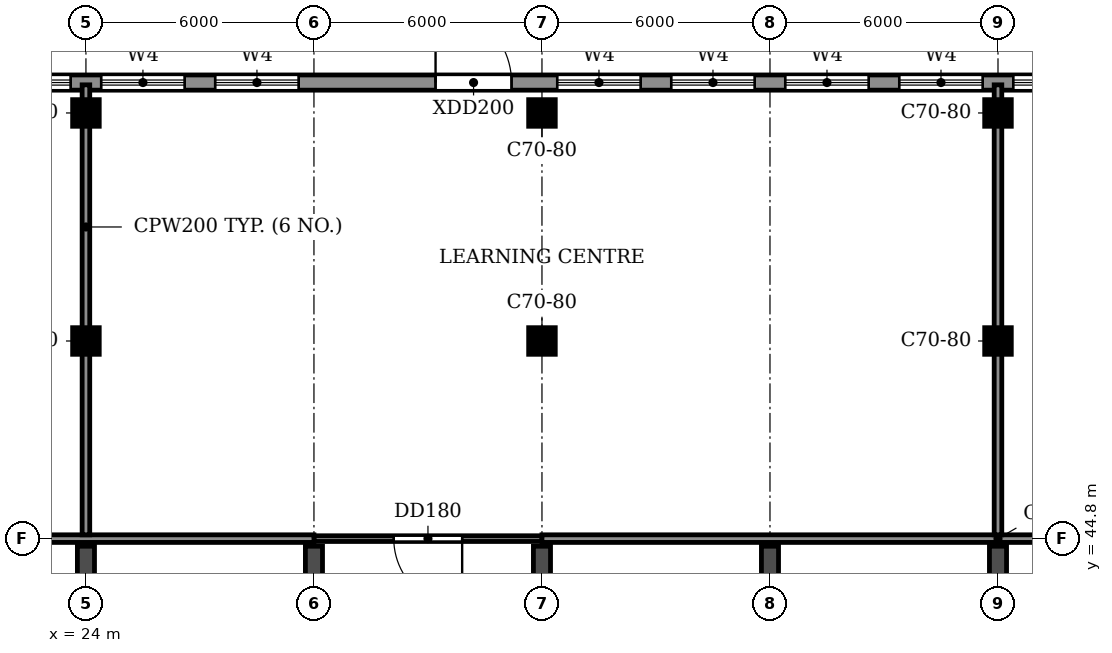
"""IFC4 building model, lengths in metres.
Left out: names, types, materials, properties, quantities, classifications, styles, units other than length and angle.
Written with IfcOpenShell. Run it as: python <this file> out.ifc"""

import sys

from ifc_helpers import new_model, si_unit, direction, frame, frame_2d, origin, origin_2d, place, context, subcontext, project, spatial, rectangle, extrude, source, transform, mapped, element, fill, save


model = new_model("IFC4")
c1 = context("Model", 3, precision=1e-05, world=origin(), true_north=direction((0.0, 1.0)))
c2 = subcontext(c1, "Body", "Model", "MODEL_VIEW")
j1 = project(units=[si_unit("LENGTHUNIT", "METRE"), si_unit("PLANEANGLEUNIT", "RADIAN")], contexts=[c1])
p1 = place(None, origin())
s1 = spatial("IfcSite", under=j1, at=p1, CompositionType="ELEMENT")
p2 = place(p1, origin())
s2 = spatial("IfcBuilding", under=s1, at=p2, CompositionType="ELEMENT")
p3 = place(p2, frame((0.0, 0.0, 15.0)))
s3 = spatial("IfcBuildingStorey", under=s2, at=p3, CompositionType="ELEMENT", Elevation=15.0)
for number, where, z_axis, x_axis in (
    (1, (24.0, 30.55, 0.0), (0.0, 0.0, 1.0), (0.0, 1.0, 0.0)),
    (2, (30.0, 30.55, 0.0), (0.0, 0.0, 1.0), (0.0, 1.0, 0.0)),
    (3, (36.0, 30.55, 0.0), (0.0, 0.0, 1.0), (0.0, 1.0, 0.0)),
    (4, (42.0, 30.55, 0.0), (0.0, 0.0, 1.0), (0.0, 1.0, 0.0)),
    (5, (48.0, 30.55, 0.0), (0.0, 0.0, 1.0), (0.0, 1.0, 0.0)),
):
    element("IfcWall", number, at=place(p3, frame(where, z_axis=z_axis, x_axis=x_axis)), inside=s3, PredefinedType="SHEAR", context=c2, shape_type="SweptSolid", body=[
        extrude(rectangle(XDim=14.05, YDim=0.45, at=frame_2d((7.025, 0.0))), origin(), (0.0, 0.0, 1.0), 3.92),
    ])
m1 = source(origin(), c2, "Body", "SweptSolid", [
    extrude(rectangle(XDim=0.7, YDim=0.7, at=origin_2d()), origin(), (0.0, 0.0, 1.0), 3.92),
])
for number, where, z_axis, x_axis in (
    (6, (24.0, 56.0, 0.0), (0.0, 0.0, 1.0), (1.0, 0.0, 0.0)),
    (7, (36.0, 56.0, 0.0), (0.0, 0.0, 1.0), (1.0, 0.0, 0.0)),
    (8, (48.0, 56.0, 0.0), (0.0, 0.0, 1.0), (1.0, 0.0, 0.0)),
    (9, (24.0, 50.0, 0.0), (0.0, 0.0, 1.0), (1.0, 0.0, 0.0)),
    (10, (36.0, 50.0, 0.0), (0.0, 0.0, 1.0), (1.0, 0.0, 0.0)),
    (11, (48.0, 50.0, 0.0), (0.0, 0.0, 1.0), (1.0, 0.0, 0.0)),
):
    element("IfcColumn", number, at=place(p3, frame(where, z_axis=z_axis, x_axis=x_axis)), inside=s3, PredefinedType="COLUMN", context=c2, shape_type="MappedRepresentation", body=[
        mapped(m1, transform((0.0, 0.0, 0.0))),
    ])
p4 = place(p3, frame((105.0, 56.8, 0.0), z_axis=(0.0, 0.0, 1.0), x_axis=(-1.0, 0.0, 0.0)))
e12 = element("IfcWall", 12, at=p4, inside=s3, PredefinedType="STANDARD", context=c2, shape_type="SweptSolid", body=[
    extrude(rectangle(XDim=108.0, YDim=0.4, at=frame_2d((54.0, 0.0))), origin(), (0.0, 0.0, 1.0), 3.92),
])
p5 = place(p4, frame((102.4, 0.0, 0.9)))
e13 = element("IfcOpeningElement", 13, at=p5, cuts=e12, PredefinedType="OPENING", context=c2, shape_type="SweptSolid", body=[
    extrude(rectangle(XDim=2.2, YDim=2.7, at=frame_2d((1.1, 1.35))), frame((0.0, 0.21, 0.0), z_axis=(0.0, -1.0, 0.0), x_axis=(1.0, 0.0, 0.0)), (0.0, 0.0, 1.0), 0.42),
])
p6 = place(p4, frame((99.4, 0.0, 0.9)))
e14 = element("IfcOpeningElement", 14, at=p6, cuts=e12, PredefinedType="OPENING", context=c2, shape_type="SweptSolid", body=[
    extrude(rectangle(XDim=2.2, YDim=2.7, at=frame_2d((1.1, 1.35))), frame((0.0, 0.21, 0.0), z_axis=(0.0, -1.0, 0.0), x_axis=(1.0, 0.0, 0.0)), (0.0, 0.0, 1.0), 0.42),
])
p7 = place(p4, frame((90.4, 0.0, 0.9)))
e15 = element("IfcOpeningElement", 15, at=p7, cuts=e12, PredefinedType="OPENING", context=c2, shape_type="SweptSolid", body=[
    extrude(rectangle(XDim=2.2, YDim=2.7, at=frame_2d((1.1, 1.35))), frame((0.0, 0.21, 0.0), z_axis=(0.0, -1.0, 0.0), x_axis=(1.0, 0.0, 0.0)), (0.0, 0.0, 1.0), 0.42),
])
p8 = place(p4, frame((87.4, 0.0, 0.9)))
e16 = element("IfcOpeningElement", 16, at=p8, cuts=e12, PredefinedType="OPENING", context=c2, shape_type="SweptSolid", body=[
    extrude(rectangle(XDim=2.2, YDim=2.7, at=frame_2d((1.1, 1.35))), frame((0.0, 0.21, 0.0), z_axis=(0.0, -1.0, 0.0), x_axis=(1.0, 0.0, 0.0)), (0.0, 0.0, 1.0), 0.42),
])
p9 = place(p4, frame((84.4, 0.0, 0.9)))
e17 = element("IfcOpeningElement", 17, at=p9, cuts=e12, PredefinedType="OPENING", context=c2, shape_type="SweptSolid", body=[
    extrude(rectangle(XDim=2.2, YDim=2.7, at=frame_2d((1.1, 1.35))), frame((0.0, 0.21, 0.0), z_axis=(0.0, -1.0, 0.0), x_axis=(1.0, 0.0, 0.0)), (0.0, 0.0, 1.0), 0.42),
])
p10 = place(p4, frame((81.4, 0.0, 0.9)))
e18 = element("IfcOpeningElement", 18, at=p10, cuts=e12, PredefinedType="OPENING", context=c2, shape_type="SweptSolid", body=[
    extrude(rectangle(XDim=2.2, YDim=2.7, at=frame_2d((1.1, 1.35))), frame((0.0, 0.21, 0.0), z_axis=(0.0, -1.0, 0.0), x_axis=(1.0, 0.0, 0.0)), (0.0, 0.0, 1.0), 0.42),
])
p11 = place(p4, frame((78.4, 0.0, 0.9)))
e19 = element("IfcOpeningElement", 19, at=p11, cuts=e12, PredefinedType="OPENING", context=c2, shape_type="SweptSolid", body=[
    extrude(rectangle(XDim=2.2, YDim=2.7, at=frame_2d((1.1, 1.35))), frame((0.0, 0.21, 0.0), z_axis=(0.0, -1.0, 0.0), x_axis=(1.0, 0.0, 0.0)), (0.0, 0.0, 1.0), 0.42),
])
p12 = place(p4, frame((75.4, 0.0, 0.9)))
e20 = element("IfcOpeningElement", 20, at=p12, cuts=e12, PredefinedType="OPENING", context=c2, shape_type="SweptSolid", body=[
    extrude(rectangle(XDim=2.2, YDim=2.7, at=frame_2d((1.1, 1.35))), frame((0.0, 0.21, 0.0), z_axis=(0.0, -1.0, 0.0), x_axis=(1.0, 0.0, 0.0)), (0.0, 0.0, 1.0), 0.42),
])
p13 = place(p4, frame((66.4, 0.0, 0.9)))
e21 = element("IfcOpeningElement", 21, at=p13, cuts=e12, PredefinedType="OPENING", context=c2, shape_type="SweptSolid", body=[
    extrude(rectangle(XDim=2.2, YDim=2.7, at=frame_2d((1.1, 1.35))), frame((0.0, 0.21, 0.0), z_axis=(0.0, -1.0, 0.0), x_axis=(1.0, 0.0, 0.0)), (0.0, 0.0, 1.0), 0.42),
])
p14 = place(p4, frame((63.4, 0.0, 0.9)))
e22 = element("IfcOpeningElement", 22, at=p14, cuts=e12, PredefinedType="OPENING", context=c2, shape_type="SweptSolid", body=[
    extrude(rectangle(XDim=2.2, YDim=2.7, at=frame_2d((1.1, 1.35))), frame((0.0, 0.21, 0.0), z_axis=(0.0, -1.0, 0.0), x_axis=(1.0, 0.0, 0.0)), (0.0, 0.0, 1.0), 0.42),
])
p15 = place(p4, frame((60.4, 0.0, 0.9)))
e23 = element("IfcOpeningElement", 23, at=p15, cuts=e12, PredefinedType="OPENING", context=c2, shape_type="SweptSolid", body=[
    extrude(rectangle(XDim=2.2, YDim=2.7, at=frame_2d((1.1, 1.35))), frame((0.0, 0.21, 0.0), z_axis=(0.0, -1.0, 0.0), x_axis=(1.0, 0.0, 0.0)), (0.0, 0.0, 1.0), 0.42),
])
p16 = place(p4, frame((57.4, 0.0, 0.9)))
e24 = element("IfcOpeningElement", 24, at=p16, cuts=e12, PredefinedType="OPENING", context=c2, shape_type="SweptSolid", body=[
    extrude(rectangle(XDim=2.2, YDim=2.7, at=frame_2d((1.1, 1.35))), frame((0.0, 0.21, 0.0), z_axis=(0.0, -1.0, 0.0), x_axis=(1.0, 0.0, 0.0)), (0.0, 0.0, 1.0), 0.42),
])
p17 = place(p4, frame((54.4, 0.0, 0.9)))
e25 = element("IfcOpeningElement", 25, at=p17, cuts=e12, PredefinedType="OPENING", context=c2, shape_type="SweptSolid", body=[
    extrude(rectangle(XDim=2.2, YDim=2.7, at=frame_2d((1.1, 1.35))), frame((0.0, 0.21, 0.0), z_axis=(0.0, -1.0, 0.0), x_axis=(1.0, 0.0, 0.0)), (0.0, 0.0, 1.0), 0.42),
])
p18 = place(p4, frame((51.4, 0.0, 0.9)))
e26 = element("IfcOpeningElement", 26, at=p18, cuts=e12, PredefinedType="OPENING", context=c2, shape_type="SweptSolid", body=[
    extrude(rectangle(XDim=2.2, YDim=2.7, at=frame_2d((1.1, 1.35))), frame((0.0, 0.21, 0.0), z_axis=(0.0, -1.0, 0.0), x_axis=(1.0, 0.0, 0.0)), (0.0, 0.0, 1.0), 0.42),
])
p19 = place(p4, frame((48.4, 0.0, 0.9)))
e27 = element("IfcOpeningElement", 27, at=p19, cuts=e12, PredefinedType="OPENING", context=c2, shape_type="SweptSolid", body=[
    extrude(rectangle(XDim=2.2, YDim=2.7, at=frame_2d((1.1, 1.35))), frame((0.0, 0.21, 0.0), z_axis=(0.0, -1.0, 0.0), x_axis=(1.0, 0.0, 0.0)), (0.0, 0.0, 1.0), 0.42),
])
p20 = place(p4, frame((45.4, 0.0, 0.9)))
e28 = element("IfcOpeningElement", 28, at=p20, cuts=e12, PredefinedType="OPENING", context=c2, shape_type="SweptSolid", body=[
    extrude(rectangle(XDim=2.2, YDim=2.7, at=frame_2d((1.1, 1.35))), frame((0.0, 0.21, 0.0), z_axis=(0.0, -1.0, 0.0), x_axis=(1.0, 0.0, 0.0)), (0.0, 0.0, 1.0), 0.42),
])
p21 = place(p4, frame((42.4, 0.0, 0.9)))
e29 = element("IfcOpeningElement", 29, at=p21, cuts=e12, PredefinedType="OPENING", context=c2, shape_type="SweptSolid", body=[
    extrude(rectangle(XDim=2.2, YDim=2.7, at=frame_2d((1.1, 1.35))), frame((0.0, 0.21, 0.0), z_axis=(0.0, -1.0, 0.0), x_axis=(1.0, 0.0, 0.0)), (0.0, 0.0, 1.0), 0.42),
])
p22 = place(p4, frame((39.4, 0.0, 0.9)))
e30 = element("IfcOpeningElement", 30, at=p22, cuts=e12, PredefinedType="OPENING", context=c2, shape_type="SweptSolid", body=[
    extrude(rectangle(XDim=2.2, YDim=2.7, at=frame_2d((1.1, 1.35))), frame((0.0, 0.21, 0.0), z_axis=(0.0, -1.0, 0.0), x_axis=(1.0, 0.0, 0.0)), (0.0, 0.0, 1.0), 0.42),
])
p23 = place(p4, frame((36.4, 0.0, 0.9)))
e31 = element("IfcOpeningElement", 31, at=p23, cuts=e12, PredefinedType="OPENING", context=c2, shape_type="SweptSolid", body=[
    extrude(rectangle(XDim=2.2, YDim=2.7, at=frame_2d((1.1, 1.35))), frame((0.0, 0.21, 0.0), z_axis=(0.0, -1.0, 0.0), x_axis=(1.0, 0.0, 0.0)), (0.0, 0.0, 1.0), 0.42),
])
p24 = place(p4, frame((33.4, 0.0, 0.9)))
e32 = element("IfcOpeningElement", 32, at=p24, cuts=e12, PredefinedType="OPENING", context=c2, shape_type="SweptSolid", body=[
    extrude(rectangle(XDim=2.2, YDim=2.7, at=frame_2d((1.1, 1.35))), frame((0.0, 0.21, 0.0), z_axis=(0.0, -1.0, 0.0), x_axis=(1.0, 0.0, 0.0)), (0.0, 0.0, 1.0), 0.42),
])
p25 = place(p4, frame((93.65, 0.0, 0.0)))
e33 = element("IfcOpeningElement", 33, at=p25, cuts=e12, PredefinedType="OPENING", context=c2, shape_type="SweptSolid", body=[
    extrude(rectangle(XDim=2.0, YDim=2.4, at=frame_2d((1.0, 1.2))), frame((0.0, 0.21, 0.0), z_axis=(0.0, -1.0, 0.0), x_axis=(1.0, 0.0, 0.0)), (0.0, 0.0, 1.0), 0.42),
])
p26 = place(p4, frame((69.8, 0.0, 0.0)))
e34 = element("IfcOpeningElement", 34, at=p26, cuts=e12, PredefinedType="OPENING", context=c2, shape_type="SweptSolid", body=[
    extrude(rectangle(XDim=2.0, YDim=2.4, at=frame_2d((1.0, 1.2))), frame((0.0, 0.21, 0.0), z_axis=(0.0, -1.0, 0.0), x_axis=(1.0, 0.0, 0.0)), (0.0, 0.0, 1.0), 0.42),
])
p27 = place(p3, frame((30.0, 44.8, 0.0), z_axis=(0.0, 0.0, 1.0), x_axis=(1.0, 0.0, 0.0)))
e35 = element("IfcWall", 35, at=p27, inside=s3, PredefinedType="PARTITIONING", context=c2, shape_type="SweptSolid", body=[
    extrude(rectangle(XDim=6.0, YDim=0.15, at=frame_2d((3.0, 0.0))), origin(), (0.0, 0.0, 1.0), 3.92),
])
p28 = place(p27, frame((2.1, 0.0, 0.0)))
e36 = element("IfcOpeningElement", 36, at=p28, cuts=e35, PredefinedType="OPENING", context=c2, shape_type="SweptSolid", body=[
    extrude(rectangle(XDim=1.8, YDim=2.1, at=frame_2d((0.9, 1.05))), frame((0.0, 0.085, 0.0), z_axis=(0.0, -1.0, 0.0), x_axis=(1.0, 0.0, 0.0)), (0.0, 0.0, 1.0), 0.17),
])
p29 = place(p3, frame((12.0, 44.8, 0.0), z_axis=(0.0, 0.0, 1.0), x_axis=(1.0, 0.0, 0.0)))
e37 = element("IfcWall", 37, at=p29, inside=s3, PredefinedType="PARTITIONING", context=c2, shape_type="SweptSolid", body=[
    extrude(rectangle(XDim=18.0, YDim=0.2, at=frame_2d((9.0, 0.0))), origin(), (0.0, 0.0, 1.0), 3.92),
])
p30 = place(p3, frame((36.0, 44.8, 0.0), z_axis=(0.0, 0.0, 1.0), x_axis=(1.0, 0.0, 0.0)))
e38 = element("IfcWall", 38, at=p30, inside=s3, PredefinedType="PARTITIONING", context=c2, shape_type="SweptSolid", body=[
    extrude(rectangle(XDim=24.0, YDim=0.2, at=frame_2d((12.0, 0.0))), origin(), (0.0, 0.0, 1.0), 3.92),
])
for number, where, z_axis, x_axis in (
    (39, (24.0, 44.9, 0.0), (0.0, 0.0, 1.0), (0.0, 1.0, 0.0)),
    (40, (48.0, 44.9, 0.0), (0.0, 0.0, 1.0), (0.0, 1.0, 0.0)),
):
    element("IfcWall", number, at=place(p3, frame(where, z_axis=z_axis, x_axis=x_axis)), inside=s3, PredefinedType="PARTITIONING", context=c2, shape_type="SweptSolid", body=[
        extrude(rectangle(XDim=11.84, YDim=0.2, at=frame_2d((5.92, 0.0))), origin(), (0.0, 0.0, 1.0), 3.92),
    ])
p31 = place(p10, origin())
e41 = element("IfcWindow", 41, at=p31, inside=s3, PartitioningType="DOUBLE_PANEL_HORIZONTAL", PredefinedType="WINDOW", context=c2, shape_type="SweptSolid", body=[
    extrude(rectangle(XDim=2.2, YDim=2.7, at=frame_2d((1.1, 1.35))), frame((0.0, 0.03, 0.0), z_axis=(0.0, -1.0, 0.0), x_axis=(1.0, 0.0, 0.0)), (0.0, 0.0, 1.0), 0.06),
])
fill(e18, e41)
p32 = place(p11, origin())
e42 = element("IfcWindow", 42, at=p32, inside=s3, PartitioningType="DOUBLE_PANEL_HORIZONTAL", PredefinedType="WINDOW", context=c2, shape_type="SweptSolid", body=[
    extrude(rectangle(XDim=2.2, YDim=2.7, at=frame_2d((1.1, 1.35))), frame((0.0, 0.03, 0.0), z_axis=(0.0, -1.0, 0.0), x_axis=(1.0, 0.0, 0.0)), (0.0, 0.0, 1.0), 0.06),
])
fill(e19, e42)
p33 = place(p12, origin())
e43 = element("IfcWindow", 43, at=p33, inside=s3, PartitioningType="DOUBLE_PANEL_HORIZONTAL", PredefinedType="WINDOW", context=c2, shape_type="SweptSolid", body=[
    extrude(rectangle(XDim=2.2, YDim=2.7, at=frame_2d((1.1, 1.35))), frame((0.0, 0.03, 0.0), z_axis=(0.0, -1.0, 0.0), x_axis=(1.0, 0.0, 0.0)), (0.0, 0.0, 1.0), 0.06),
])
fill(e20, e43)
p34 = place(p13, origin())
e44 = element("IfcWindow", 44, at=p34, inside=s3, PartitioningType="DOUBLE_PANEL_HORIZONTAL", PredefinedType="WINDOW", context=c2, shape_type="SweptSolid", body=[
    extrude(rectangle(XDim=2.2, YDim=2.7, at=frame_2d((1.1, 1.35))), frame((0.0, 0.03, 0.0), z_axis=(0.0, -1.0, 0.0), x_axis=(1.0, 0.0, 0.0)), (0.0, 0.0, 1.0), 0.06),
])
fill(e21, e44)
p35 = place(p14, origin())
e45 = element("IfcWindow", 45, at=p35, inside=s3, PartitioningType="DOUBLE_PANEL_HORIZONTAL", PredefinedType="WINDOW", context=c2, shape_type="SweptSolid", body=[
    extrude(rectangle(XDim=2.2, YDim=2.7, at=frame_2d((1.1, 1.35))), frame((0.0, 0.03, 0.0), z_axis=(0.0, -1.0, 0.0), x_axis=(1.0, 0.0, 0.0)), (0.0, 0.0, 1.0), 0.06),
])
fill(e22, e45)
p36 = place(p15, origin())
e46 = element("IfcWindow", 46, at=p36, inside=s3, PartitioningType="DOUBLE_PANEL_HORIZONTAL", PredefinedType="WINDOW", context=c2, shape_type="SweptSolid", body=[
    extrude(rectangle(XDim=2.2, YDim=2.7, at=frame_2d((1.1, 1.35))), frame((0.0, 0.03, 0.0), z_axis=(0.0, -1.0, 0.0), x_axis=(1.0, 0.0, 0.0)), (0.0, 0.0, 1.0), 0.06),
])
fill(e23, e46)
p37 = place(p16, origin())
e47 = element("IfcWindow", 47, at=p37, inside=s3, PartitioningType="DOUBLE_PANEL_HORIZONTAL", PredefinedType="WINDOW", context=c2, shape_type="SweptSolid", body=[
    extrude(rectangle(XDim=2.2, YDim=2.7, at=frame_2d((1.1, 1.35))), frame((0.0, 0.03, 0.0), z_axis=(0.0, -1.0, 0.0), x_axis=(1.0, 0.0, 0.0)), (0.0, 0.0, 1.0), 0.06),
])
fill(e24, e47)
p38 = place(p17, origin())
e48 = element("IfcWindow", 48, at=p38, inside=s3, PartitioningType="DOUBLE_PANEL_HORIZONTAL", PredefinedType="WINDOW", context=c2, shape_type="SweptSolid", body=[
    extrude(rectangle(XDim=2.2, YDim=2.7, at=frame_2d((1.1, 1.35))), frame((0.0, 0.03, 0.0), z_axis=(0.0, -1.0, 0.0), x_axis=(1.0, 0.0, 0.0)), (0.0, 0.0, 1.0), 0.06),
])
fill(e25, e48)
p39 = place(p28, frame((1.8, 0.0, 0.0), z_axis=(0.0, 0.0, 1.0), x_axis=(-1.0, 0.0, 0.0)))
e49 = element("IfcDoor", 49, at=p39, inside=s3, OperationType="DOUBLE_DOOR_SINGLE_SWING", PredefinedType="DOOR", context=c2, shape_type="SweptSolid", body=[
    extrude(rectangle(XDim=1.8, YDim=2.1, at=frame_2d((0.9, 1.05))), frame((0.0, 0.025, 0.0), z_axis=(0.0, -1.0, 0.0), x_axis=(1.0, 0.0, 0.0)), (0.0, 0.0, 1.0), 0.05),
])
fill(e36, e49)
p40 = place(p26, frame((2.0, 0.0, 0.0), z_axis=(0.0, 0.0, 1.0), x_axis=(-1.0, 0.0, 0.0)))
e50 = element("IfcDoor", 50, at=p40, inside=s3, OperationType="DOUBLE_DOOR_SINGLE_SWING", PredefinedType="DOOR", context=c2, shape_type="SweptSolid", body=[
    extrude(rectangle(XDim=2.0, YDim=2.4, at=frame_2d((1.0, 1.2))), frame((0.0, 0.025, 0.0), z_axis=(0.0, -1.0, 0.0), x_axis=(1.0, 0.0, 0.0)), (0.0, 0.0, 1.0), 0.05),
])
fill(e34, e50)
save(model, sys.argv[1])
